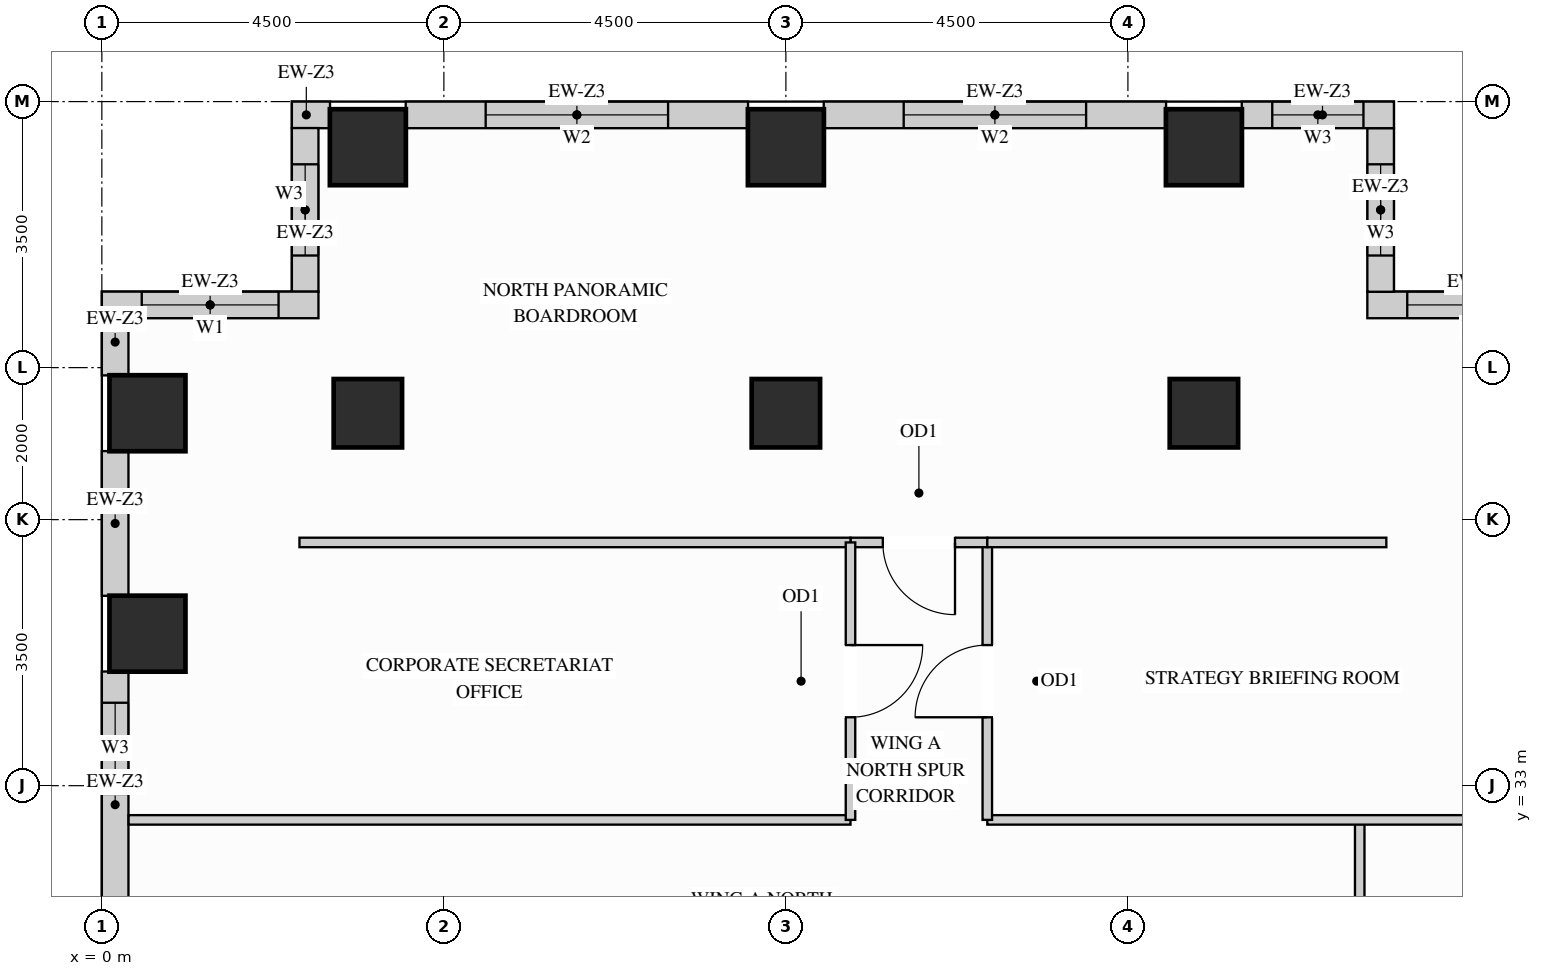
"""IFC4 building model, lengths in metres.
Left out: names, types, materials, properties, quantities, classifications, styles, units other than length and angle.
Written with IfcOpenShell. Run it as: python <this file> out.ifc"""

import sys

from ifc_helpers import new_model, si_unit, direction, frame, frame_2d, origin, origin_2d, place, context, subcontext, project, spatial, rectangle, extrude, source, transform, mapped, element, fill, save


model = new_model("IFC4")
c1 = context("Model", 3, precision=1e-05, world=origin(), true_north=direction((0.0, 1.0)))
c2 = subcontext(c1, "Body", "Model", "MODEL_VIEW")
j1 = project(units=[si_unit("LENGTHUNIT", "METRE"), si_unit("PLANEANGLEUNIT", "RADIAN")], contexts=[c1])
p1 = place(None, origin())
s1 = spatial("IfcSite", under=j1, at=p1, CompositionType="ELEMENT")
p2 = place(p1, origin())
s2 = spatial("IfcBuilding", under=s1, at=p2, CompositionType="ELEMENT")
p3 = place(p2, frame((0.0, 0.0, 153.9)))
s3 = spatial("IfcBuildingStorey", under=s2, at=p3, CompositionType="ELEMENT", Elevation=153.9)
m1 = source(origin(), c2, "Body", "SweptSolid", [
    extrude(rectangle(XDim=0.9, YDim=0.9, at=origin_2d()), origin(), (0.0, 0.0, 1.0), 3.4),
])
for number, where, z_axis, x_axis in (
    (1, (14.5, 37.9, 0.0), (0.0, 0.0, 1.0), (1.0, 0.0, 0.0)),
    (2, (3.5, 37.9, 0.0), (0.0, 0.0, 1.0), (1.0, 0.0, 0.0)),
    (3, (9.0, 37.9, 0.0), (0.0, 0.0, 1.0), (1.0, 0.0, 0.0)),
):
    element("IfcColumn", number, at=place(p3, frame(where, z_axis=z_axis, x_axis=x_axis)), inside=s3, PredefinedType="COLUMN", context=c2, shape_type="MappedRepresentation", body=[
        mapped(m1, transform((0.0, 0.0, 0.0), x_axis=(1.0, 0.0, 0.0), y_axis=(0.0, 1.0, 0.0), z_axis=(0.0, 0.0, 1.0))),
    ])
m2 = source(origin(), c2, "Body", "SweptSolid", [
    extrude(rectangle(XDim=1.0, YDim=1.0, at=origin_2d()), origin(), (0.0, 0.0, 1.0), 3.4),
])
for number, where, z_axis, x_axis in (
    (4, (14.5, 41.4, 0.0), (0.0, 0.0, 1.0), (1.0, 0.0, 0.0)),
    (5, (3.5, 41.4, 0.0), (0.0, 0.0, 1.0), (1.0, 0.0, 0.0)),
    (6, (9.0, 41.4, 0.0), (0.0, 0.0, 1.0), (1.0, 0.0, 0.0)),
    (7, (0.6, 35.0, 0.0), (0.0, 0.0, 1.0), (1.0, 0.0, 0.0)),
    (8, (0.6, 37.9, 0.0), (0.0, 0.0, 1.0), (1.0, 0.0, 0.0)),
):
    element("IfcColumn", number, at=place(p3, frame(where, z_axis=z_axis, x_axis=x_axis)), inside=s3, PredefinedType="COLUMN", context=c2, shape_type="MappedRepresentation", body=[
        mapped(m2, transform((0.0, 0.0, 0.0), x_axis=(1.0, 0.0, 0.0), y_axis=(0.0, 1.0, 0.0), z_axis=(0.0, 0.0, 1.0))),
    ])
p4 = place(p3, frame((19.5, 39.325, 0.0), z_axis=(0.0, 0.0, 1.0), x_axis=(-1.0, 0.0, 0.0)))
e9 = element("IfcWall", 9, at=p4, inside=s3, PredefinedType="SOLIDWALL", context=c2, shape_type="SweptSolid", body=[
    extrude(rectangle(XDim=2.85, YDim=0.35, at=frame_2d((1.425, 0.0))), origin(), (0.0, 0.0, 1.0), 3.385),
])
p5 = place(p4, frame((0.525, 0.0, 0.78)))
e10 = element("IfcOpeningElement", 10, at=p5, cuts=e9, PredefinedType="OPENING", context=c2, shape_type="SweptSolid", body=[
    extrude(rectangle(XDim=1.8, YDim=2.1, at=frame_2d((0.9, 1.05))), frame((0.0, 0.185, 0.0), z_axis=(0.0, -1.0, 0.0), x_axis=(1.0, 0.0, 0.0)), (0.0, 0.0, 1.0), 0.37),
])
p6 = place(p3, frame((16.825, 39.498, 0.0), z_axis=(0.0, 0.0, 1.0), x_axis=(0.0, 1.0, 0.0)))
e11 = element("IfcWall", 11, at=p6, inside=s3, PredefinedType="SOLIDWALL", context=c2, shape_type="SweptSolid", body=[
    extrude(rectangle(XDim=2.154, YDim=0.35, at=frame_2d((1.077, 0.0))), origin(), (0.0, 0.0, 1.0), 3.385),
])
p7 = place(p6, frame((0.477, 0.0, 0.78)))
e12 = element("IfcOpeningElement", 12, at=p7, cuts=e11, PredefinedType="OPENING", context=c2, shape_type="SweptSolid", body=[
    extrude(rectangle(XDim=1.2, YDim=2.1, at=frame_2d((0.6, 1.05))), frame((0.0, 0.185, 0.0), z_axis=(0.0, -1.0, 0.0), x_axis=(1.0, 0.0, 0.0)), (0.0, 0.0, 1.0), 0.37),
])
p8 = place(p3, frame((17.0, 41.825, 0.0), z_axis=(0.0, 0.0, 1.0), x_axis=(-1.0, 0.0, 0.0)))
e13 = element("IfcWall", 13, at=p8, inside=s3, PredefinedType="SOLIDWALL", context=c2, shape_type="SweptSolid", body=[
    extrude(rectangle(XDim=2.002, YDim=0.35, at=frame_2d((1.001, 0.0))), origin(), (0.0, 0.0, 1.0), 3.385),
])
p9 = place(p8, frame((0.401, 0.0, 0.78)))
e14 = element("IfcOpeningElement", 14, at=p9, cuts=e13, PredefinedType="OPENING", context=c2, shape_type="SweptSolid", body=[
    extrude(rectangle(XDim=1.2, YDim=2.1, at=frame_2d((0.6, 1.05))), frame((0.0, 0.185, 0.0), z_axis=(0.0, -1.0, 0.0), x_axis=(1.0, 0.0, 0.0)), (0.0, 0.0, 1.0), 0.37),
])
p10 = place(p3, frame((14.002, 41.825, 0.0), z_axis=(0.0, 0.0, 1.0), x_axis=(-1.0, 0.0, 0.0)))
e15 = element("IfcWall", 15, at=p10, inside=s3, PredefinedType="SOLIDWALL", context=c2, shape_type="SweptSolid", body=[
    extrude(rectangle(XDim=4.504, YDim=0.35, at=frame_2d((2.252, 0.0))), origin(), (0.0, 0.0, 1.0), 2.612),
])
p11 = place(p10, frame((1.052, 0.0, 0.78)))
e16 = element("IfcOpeningElement", 16, at=p11, cuts=e15, PredefinedType="OPENING", context=c2, shape_type="SweptSolid", body=[
    extrude(rectangle(XDim=2.4, YDim=1.652, at=frame_2d((1.2, 0.826))), frame((0.0, 0.185, 0.0), z_axis=(0.0, -1.0, 0.0), x_axis=(1.0, 0.0, 0.0)), (0.0, 0.0, 1.0), 0.37),
])
p12 = place(p3, frame((8.502, 41.825, 0.0), z_axis=(0.0, 0.0, 1.0), x_axis=(-1.0, 0.0, 0.0)))
e17 = element("IfcWall", 17, at=p12, inside=s3, PredefinedType="SOLIDWALL", context=c2, shape_type="SweptSolid", body=[
    extrude(rectangle(XDim=4.504, YDim=0.35, at=frame_2d((2.252, 0.0))), origin(), (0.0, 0.0, 1.0), 2.612),
])
p13 = place(p12, frame((1.052, 0.0, 0.78)))
e18 = element("IfcOpeningElement", 18, at=p13, cuts=e17, PredefinedType="OPENING", context=c2, shape_type="SweptSolid", body=[
    extrude(rectangle(XDim=2.4, YDim=1.652, at=frame_2d((1.2, 0.826))), frame((0.0, 0.185, 0.0), z_axis=(0.0, -1.0, 0.0), x_axis=(1.0, 0.0, 0.0)), (0.0, 0.0, 1.0), 0.37),
])
m3 = source(origin(), c2, "Body", "SweptSolid", [
    extrude(rectangle(XDim=0.502, YDim=0.35, at=frame_2d((0.251, 0.0))), origin(), (0.0, 0.0, 1.0), 3.385),
])
p14 = place(p3, frame((3.002, 41.825, 0.0), z_axis=(0.0, 0.0, 1.0), x_axis=(-1.0, 0.0, 0.0)))
e19 = element("IfcWall", 19, at=p14, inside=s3, PredefinedType="SOLIDWALL", context=c2, shape_type="MappedRepresentation", body=[
    mapped(m3, transform((0.0, 0.0, 0.0), x_axis=(1.0, 0.0, 0.0), y_axis=(0.0, 1.0, 0.0), z_axis=(0.0, 0.0, 1.0))),
])
p15 = place(p3, frame((2.675, 41.652, 0.0), z_axis=(0.0, 0.0, 1.0), x_axis=(0.0, -1.0, 0.0)))
e20 = element("IfcWall", 20, at=p15, inside=s3, PredefinedType="SOLIDWALL", context=c2, shape_type="SweptSolid", body=[
    extrude(rectangle(XDim=2.154, YDim=0.35, at=frame_2d((1.077, 0.0))), origin(), (0.0, 0.0, 1.0), 3.385),
])
p16 = place(p15, frame((0.477, 0.0, 0.78)))
e21 = element("IfcOpeningElement", 21, at=p16, cuts=e20, PredefinedType="OPENING", context=c2, shape_type="SweptSolid", body=[
    extrude(rectangle(XDim=1.2, YDim=2.1, at=frame_2d((0.6, 1.05))), frame((0.0, 0.185, 0.0), z_axis=(0.0, -1.0, 0.0), x_axis=(1.0, 0.0, 0.0)), (0.0, 0.0, 1.0), 0.37),
])
p17 = place(p3, frame((2.85, 39.325, 0.0), z_axis=(0.0, 0.0, 1.0), x_axis=(-1.0, 0.0, 0.0)))
e22 = element("IfcWall", 22, at=p17, inside=s3, PredefinedType="SOLIDWALL", context=c2, shape_type="SweptSolid", body=[
    extrude(rectangle(XDim=2.85, YDim=0.35, at=frame_2d((1.425, 0.0))), origin(), (0.0, 0.0, 1.0), 3.385),
])
p18 = place(p17, frame((0.525, 0.0, 0.78)))
e23 = element("IfcOpeningElement", 23, at=p18, cuts=e22, PredefinedType="OPENING", context=c2, shape_type="SweptSolid", body=[
    extrude(rectangle(XDim=1.8, YDim=2.1, at=frame_2d((0.9, 1.05))), frame((0.0, 0.185, 0.0), z_axis=(0.0, -1.0, 0.0), x_axis=(1.0, 0.0, 0.0)), (0.0, 0.0, 1.0), 0.37),
])
m4 = source(origin(), c2, "Body", "SweptSolid", [
    extrude(rectangle(XDim=0.754, YDim=0.35, at=frame_2d((0.377, 0.0))), origin(), (0.0, 0.0, 1.0), 3.385),
])
p19 = place(p3, frame((0.175, 39.152, 0.0), z_axis=(0.0, 0.0, 1.0), x_axis=(0.0, -1.0, 0.0)))
e24 = element("IfcWall", 24, at=p19, inside=s3, PredefinedType="SOLIDWALL", context=c2, shape_type="MappedRepresentation", body=[
    mapped(m4, transform((0.0, 0.0, 0.0), x_axis=(1.0, 0.0, 0.0), y_axis=(0.0, 1.0, 0.0), z_axis=(0.0, 0.0, 1.0))),
])
m5 = source(origin(), c2, "Body", "SweptSolid", [
    extrude(rectangle(XDim=1.904, YDim=0.35, at=frame_2d((0.952, 0.0))), origin(), (0.0, 0.0, 1.0), 2.612),
])
p20 = place(p3, frame((0.175, 37.402, 0.0), z_axis=(0.0, 0.0, 1.0), x_axis=(0.0, -1.0, 0.0)))
e25 = element("IfcWall", 25, at=p20, inside=s3, PredefinedType="SOLIDWALL", context=c2, shape_type="MappedRepresentation", body=[
    mapped(m5, transform((0.0, 0.0, 0.0), x_axis=(1.0, 0.0, 0.0), y_axis=(0.0, 1.0, 0.0), z_axis=(0.0, 0.0, 1.0))),
])
p21 = place(p3, frame((0.175, 34.502, 0.0), z_axis=(0.0, 0.0, 1.0), x_axis=(0.0, -1.0, 0.0)))
e26 = element("IfcWall", 26, at=p21, inside=s3, PredefinedType="SOLIDWALL", context=c2, shape_type="SweptSolid", body=[
    extrude(rectangle(XDim=3.504, YDim=0.35, at=frame_2d((1.752, 0.0))), origin(), (0.0, 0.0, 1.0), 2.612),
])
p22 = place(p21, frame((0.411, 0.0, 0.78)))
e27 = element("IfcOpeningElement", 27, at=p22, cuts=e26, PredefinedType="OPENING", context=c2, shape_type="SweptSolid", body=[
    extrude(rectangle(XDim=1.2, YDim=1.652, at=frame_2d((0.6, 0.826))), frame((0.0, 0.185, 0.0), z_axis=(0.0, -1.0, 0.0), x_axis=(1.0, 0.0, 0.0)), (0.0, 0.0, 1.0), 0.37),
])
p23 = place(p3, frame((16.55, 26.05, 0.0), z_axis=(0.0, 0.0, 1.0), x_axis=(0.0, 1.0, 0.0)))
e28 = element("IfcWall", 28, at=p23, inside=s3, PredefinedType="PARTITIONING", context=c2, shape_type="SweptSolid", body=[
    extrude(rectangle(XDim=6.5, YDim=0.125, at=frame_2d((3.25, 0.0))), origin(), (0.0, 0.0, 1.0), 3.385),
])
p24 = place(p23, frame((2.775, 0.0, 0.0)))
e29 = element("IfcOpeningElement", 29, at=p24, cuts=e28, PredefinedType="OPENING", context=c2, shape_type="SweptSolid", body=[
    extrude(rectangle(XDim=0.95, YDim=2.15, at=frame_2d((0.475, 1.075))), frame((0.0, 0.073, 0.0), z_axis=(0.0, -1.0, 0.0), x_axis=(1.0, 0.0, 0.0)), (0.0, 0.0, 1.0), 0.145),
])
m6 = source(origin(), c2, "Body", "SweptSolid", [
    extrude(rectangle(XDim=7.498, YDim=0.125, at=frame_2d((3.749, 0.0))), origin(), (0.0, 0.0, 1.0), 3.385),
])
p25 = place(p3, frame((11.65, 32.55, 0.0), z_axis=(0.0, 0.0, 1.0), x_axis=(1.0, 0.0, 0.0)))
e30 = element("IfcWall", 30, at=p25, inside=s3, PredefinedType="PARTITIONING", context=c2, shape_type="MappedRepresentation", body=[
    mapped(m6, transform((0.0, 0.0, 0.0), x_axis=(1.0, 0.0, 0.0), y_axis=(0.0, 1.0, 0.0), z_axis=(0.0, 0.0, 1.0))),
])
m7 = source(origin(), c2, "Body", "SweptSolid", [
    extrude(rectangle(XDim=9.498, YDim=0.125, at=frame_2d((4.749, 0.0))), origin(), (0.0, 0.0, 1.0), 3.385),
])
p26 = place(p3, frame((0.352, 32.55, 0.0), z_axis=(0.0, 0.0, 1.0), x_axis=(1.0, 0.0, 0.0)))
e31 = element("IfcWall", 31, at=p26, inside=s3, PredefinedType="PARTITIONING", context=c2, shape_type="MappedRepresentation", body=[
    mapped(m7, transform((0.0, 0.0, 0.0), x_axis=(1.0, 0.0, 0.0), y_axis=(0.0, 1.0, 0.0), z_axis=(0.0, 0.0, 1.0))),
])
p27 = place(p3, frame((11.65, 32.55, 0.0), z_axis=(0.0, 0.0, 1.0), x_axis=(0.0, 1.0, 0.0)))
e32 = element("IfcWall", 32, at=p27, inside=s3, PredefinedType="PARTITIONING", context=c2, shape_type="SweptSolid", body=[
    extrude(rectangle(XDim=3.65, YDim=0.125, at=frame_2d((1.825, 0.0))), origin(), (0.0, 0.0, 1.0), 3.385),
])
p28 = place(p27, frame((1.35, 0.0, 0.0)))
e33 = element("IfcOpeningElement", 33, at=p28, cuts=e32, PredefinedType="OPENING", context=c2, shape_type="SweptSolid", body=[
    extrude(rectangle(XDim=0.95, YDim=2.15, at=frame_2d((0.475, 1.075))), frame((0.0, 0.073, 0.0), z_axis=(0.0, -1.0, 0.0), x_axis=(1.0, 0.0, 0.0)), (0.0, 0.0, 1.0), 0.145),
])
p29 = place(p3, frame((9.85, 36.2, 0.0), z_axis=(0.0, 0.0, 1.0), x_axis=(1.0, 0.0, 0.0)))
e34 = element("IfcWall", 34, at=p29, inside=s3, PredefinedType="PARTITIONING", context=c2, shape_type="SweptSolid", body=[
    extrude(rectangle(XDim=1.8, YDim=0.125, at=frame_2d((0.9, 0.0))), origin(), (0.0, 0.0, 1.0), 2.848),
])
p30 = place(p29, frame((0.425, 0.0, 0.0)))
e35 = element("IfcOpeningElement", 35, at=p30, cuts=e34, PredefinedType="OPENING", context=c2, shape_type="SweptSolid", body=[
    extrude(rectangle(XDim=0.95, YDim=2.15, at=frame_2d((0.475, 1.075))), frame((0.0, 0.073, 0.0), z_axis=(0.0, -1.0, 0.0), x_axis=(1.0, 0.0, 0.0)), (0.0, 0.0, 1.0), 0.145),
])
m8 = source(origin(), c2, "Body", "SweptSolid", [
    extrude(rectangle(XDim=5.25, YDim=0.125, at=frame_2d((2.625, 0.0))), origin(), (0.0, 0.0, 1.0), 2.848),
])
p31 = place(p3, frame((11.65, 36.2, 0.0), z_axis=(0.0, 0.0, 1.0), x_axis=(1.0, 0.0, 0.0)))
e36 = element("IfcWall", 36, at=p31, inside=s3, PredefinedType="PARTITIONING", context=c2, shape_type="MappedRepresentation", body=[
    mapped(m8, transform((0.0, 0.0, 0.0), x_axis=(1.0, 0.0, 0.0), y_axis=(0.0, 1.0, 0.0), z_axis=(0.0, 0.0, 1.0))),
])
m9 = source(origin(), c2, "Body", "SweptSolid", [
    extrude(rectangle(XDim=7.25, YDim=0.125, at=frame_2d((3.625, 0.0))), origin(), (0.0, 0.0, 1.0), 2.848),
])
p32 = place(p3, frame((2.6, 36.2, 0.0), z_axis=(0.0, 0.0, 1.0), x_axis=(1.0, 0.0, 0.0)))
e37 = element("IfcWall", 37, at=p32, inside=s3, PredefinedType="PARTITIONING", context=c2, shape_type="MappedRepresentation", body=[
    mapped(m9, transform((0.0, 0.0, 0.0), x_axis=(1.0, 0.0, 0.0), y_axis=(0.0, 1.0, 0.0), z_axis=(0.0, 0.0, 1.0))),
])
p33 = place(p3, frame((9.85, 32.55, 0.0), z_axis=(0.0, 0.0, 1.0), x_axis=(0.0, 1.0, 0.0)))
e38 = element("IfcWall", 38, at=p33, inside=s3, PredefinedType="PARTITIONING", context=c2, shape_type="SweptSolid", body=[
    extrude(rectangle(XDim=3.65, YDim=0.125, at=frame_2d((1.825, 0.0))), origin(), (0.0, 0.0, 1.0), 3.385),
])
p34 = place(p33, frame((1.35, 0.0, 0.0)))
e39 = element("IfcOpeningElement", 39, at=p34, cuts=e38, PredefinedType="OPENING", context=c2, shape_type="SweptSolid", body=[
    extrude(rectangle(XDim=0.95, YDim=2.15, at=frame_2d((0.475, 1.075))), frame((0.0, 0.073, 0.0), z_axis=(0.0, -1.0, 0.0), x_axis=(1.0, 0.0, 0.0)), (0.0, 0.0, 1.0), 0.145),
])
m10 = source(origin(), c2, "Body", "SweptSolid", [
    extrude(rectangle(XDim=0.95, YDim=2.15, at=frame_2d((0.475, 1.075))), frame((0.0, 0.025, 0.0), z_axis=(0.0, -1.0, 0.0), x_axis=(1.0, 0.0, 0.0)), (0.0, 0.0, 1.0), 0.05),
])
p35 = place(p28, origin())
e40 = element("IfcDoor", 40, at=p35, inside=s3, OperationType="SINGLE_SWING_LEFT", PredefinedType="DOOR", context=c2, shape_type="MappedRepresentation", body=[
    mapped(m10, transform((0.0, 0.0, 0.0), x_axis=(1.0, 0.0, 0.0), y_axis=(0.0, 1.0, 0.0), z_axis=(0.0, 0.0, 1.0))),
])
fill(e33, e40)
p36 = place(p30, origin())
e41 = element("IfcDoor", 41, at=p36, inside=s3, OperationType="SINGLE_SWING_RIGHT", PredefinedType="DOOR", context=c2, shape_type="MappedRepresentation", body=[
    mapped(m10, transform((0.0, 0.0, 0.0), x_axis=(1.0, 0.0, 0.0), y_axis=(0.0, 1.0, 0.0), z_axis=(0.0, 0.0, 1.0))),
])
fill(e35, e41)
p37 = place(p34, origin())
e42 = element("IfcDoor", 42, at=p37, inside=s3, OperationType="SINGLE_SWING_RIGHT", PredefinedType="DOOR", context=c2, shape_type="MappedRepresentation", body=[
    mapped(m10, transform((0.0, 0.0, 0.0), x_axis=(1.0, 0.0, 0.0), y_axis=(0.0, 1.0, 0.0), z_axis=(0.0, 0.0, 1.0))),
])
fill(e39, e42)
m11 = source(origin(), c2, "Body", "SweptSolid", [
    extrude(rectangle(XDim=1.8, YDim=2.1, at=frame_2d((0.9, 1.05))), frame((0.0, 0.03, 0.0), z_axis=(0.0, -1.0, 0.0), x_axis=(1.0, 0.0, 0.0)), (0.0, 0.0, 1.0), 0.06),
])
p38 = place(p5, origin())
e43 = element("IfcWindow", 43, at=p38, inside=s3, PartitioningType="SINGLE_PANEL", PredefinedType="WINDOW", context=c2, shape_type="MappedRepresentation", body=[
    mapped(m11, transform((0.0, 0.0, 0.0), x_axis=(1.0, 0.0, 0.0), y_axis=(0.0, 1.0, 0.0), z_axis=(0.0, 0.0, 1.0))),
])
fill(e10, e43)
p39 = place(p18, origin())
e44 = element("IfcWindow", 44, at=p39, inside=s3, PartitioningType="SINGLE_PANEL", PredefinedType="WINDOW", context=c2, shape_type="MappedRepresentation", body=[
    mapped(m11, transform((0.0, 0.0, 0.0), x_axis=(1.0, 0.0, 0.0), y_axis=(0.0, 1.0, 0.0), z_axis=(0.0, 0.0, 1.0))),
])
fill(e23, e44)
m12 = source(origin(), c2, "Body", "SweptSolid", [
    extrude(rectangle(XDim=2.4, YDim=1.652, at=frame_2d((1.2, 0.826))), frame((0.0, 0.03, 0.0), z_axis=(0.0, -1.0, 0.0), x_axis=(1.0, 0.0, 0.0)), (0.0, 0.0, 1.0), 0.06),
])
p40 = place(p11, origin())
e45 = element("IfcWindow", 45, at=p40, inside=s3, PartitioningType="SINGLE_PANEL", PredefinedType="WINDOW", context=c2, shape_type="MappedRepresentation", body=[
    mapped(m12, transform((0.0, 0.0, 0.0), x_axis=(1.0, 0.0, 0.0), y_axis=(0.0, 1.0, 0.0), z_axis=(0.0, 0.0, 1.0))),
])
fill(e16, e45)
p41 = place(p13, origin())
e46 = element("IfcWindow", 46, at=p41, inside=s3, PartitioningType="SINGLE_PANEL", PredefinedType="WINDOW", context=c2, shape_type="MappedRepresentation", body=[
    mapped(m12, transform((0.0, 0.0, 0.0), x_axis=(1.0, 0.0, 0.0), y_axis=(0.0, 1.0, 0.0), z_axis=(0.0, 0.0, 1.0))),
])
fill(e18, e46)
m13 = source(origin(), c2, "Body", "SweptSolid", [
    extrude(rectangle(XDim=1.2, YDim=2.1, at=frame_2d((0.6, 1.05))), frame((0.0, 0.03, 0.0), z_axis=(0.0, -1.0, 0.0), x_axis=(1.0, 0.0, 0.0)), (0.0, 0.0, 1.0), 0.06),
])
p42 = place(p7, origin())
e47 = element("IfcWindow", 47, at=p42, inside=s3, PartitioningType="SINGLE_PANEL", PredefinedType="WINDOW", context=c2, shape_type="MappedRepresentation", body=[
    mapped(m13, transform((0.0, 0.0, 0.0), x_axis=(1.0, 0.0, 0.0), y_axis=(0.0, 1.0, 0.0), z_axis=(0.0, 0.0, 1.0))),
])
fill(e12, e47)
p43 = place(p9, origin())
e48 = element("IfcWindow", 48, at=p43, inside=s3, PartitioningType="SINGLE_PANEL", PredefinedType="WINDOW", context=c2, shape_type="MappedRepresentation", body=[
    mapped(m13, transform((0.0, 0.0, 0.0), x_axis=(1.0, 0.0, 0.0), y_axis=(0.0, 1.0, 0.0), z_axis=(0.0, 0.0, 1.0))),
])
fill(e14, e48)
p44 = place(p16, origin())
e49 = element("IfcWindow", 49, at=p44, inside=s3, PartitioningType="SINGLE_PANEL", PredefinedType="WINDOW", context=c2, shape_type="MappedRepresentation", body=[
    mapped(m13, transform((0.0, 0.0, 0.0), x_axis=(1.0, 0.0, 0.0), y_axis=(0.0, 1.0, 0.0), z_axis=(0.0, 0.0, 1.0))),
])
fill(e21, e49)
m14 = source(origin(), c2, "Body", "SweptSolid", [
    extrude(rectangle(XDim=1.2, YDim=1.652, at=frame_2d((0.6, 0.826))), frame((0.0, 0.03, 0.0), z_axis=(0.0, -1.0, 0.0), x_axis=(1.0, 0.0, 0.0)), (0.0, 0.0, 1.0), 0.06),
])
p45 = place(p22, origin())
e50 = element("IfcWindow", 50, at=p45, inside=s3, PartitioningType="SINGLE_PANEL", PredefinedType="WINDOW", context=c2, shape_type="MappedRepresentation", body=[
    mapped(m14, transform((0.0, 0.0, 0.0), x_axis=(1.0, 0.0, 0.0), y_axis=(0.0, 1.0, 0.0), z_axis=(0.0, 0.0, 1.0))),
])
fill(e27, e50)
save(model, sys.argv[1])
